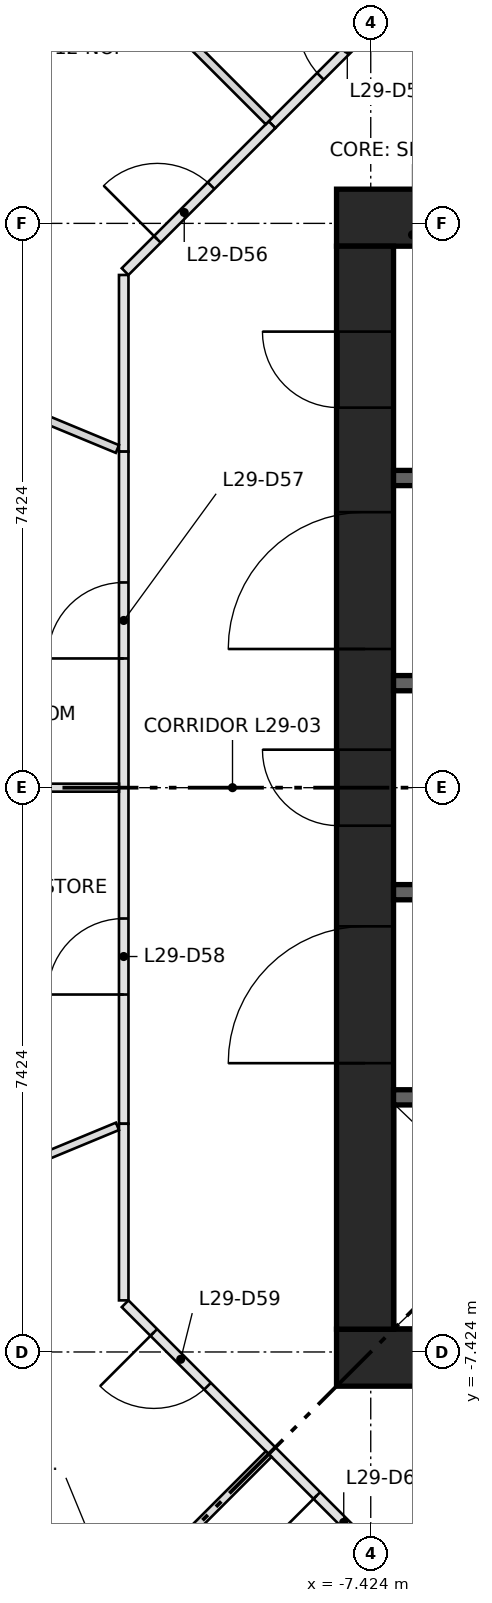
"""IFC4 building model, lengths in metres.
Left out: names, types, materials, properties, quantities, classifications, styles, units other than length and angle.
Written with IfcOpenShell. Run it as: python <this file> out.ifc"""

import sys

from ifc_helpers import new_model, si_unit, direction, frame, frame_2d, origin, place, context, subcontext, project, spatial, rectangle, extrude, element, fill, save


model = new_model("IFC4")
c1 = context("Model", 3, precision=1e-05, world=origin(), true_north=direction((0.0, 1.0)))
c2 = subcontext(c1, "Body", "Model", "MODEL_VIEW")
j1 = project(units=[si_unit("LENGTHUNIT", "METRE"), si_unit("PLANEANGLEUNIT", "RADIAN")], contexts=[c1])
p1 = place(None, origin())
s1 = spatial("IfcSite", under=j1, at=p1, CompositionType="ELEMENT")
p2 = place(p1, origin())
s2 = spatial("IfcBuilding", under=s1, at=p2, CompositionType="ELEMENT")
p3 = place(p2, frame((0.0, 0.0, 112.9)))
s3 = spatial("IfcBuildingStorey", under=s2, at=p3, CompositionType="ELEMENT", Elevation=112.9)
for number, where, z_axis, x_axis in (
    (1, (-7.874, -7.499, 0.0), (0.0, 0.0, 1.0), (1.0, 0.0, 0.0)),
    (2, (-7.874, 7.499, 0.0), (0.0, 0.0, 1.0), (1.0, 0.0, 0.0)),
):
    element("IfcWall", number, at=place(p3, frame(where, z_axis=z_axis, x_axis=x_axis)), inside=s3, PredefinedType="SHEAR", context=c2, shape_type="SweptSolid", body=[
        extrude(rectangle(XDim=15.748, YDim=0.75, at=frame_2d((7.874, 0.0))), origin(), (0.0, 0.0, 1.0), 3.65),
    ])
p4 = place(p3, frame((-7.499, -7.124, 0.0), z_axis=(0.0, 0.0, 1.0), x_axis=(0.0, 1.0, 0.0)))
e3 = element("IfcWall", 3, at=p4, inside=s3, PredefinedType="SHEAR", context=c2, shape_type="SweptSolid", body=[
    extrude(rectangle(XDim=14.248, YDim=0.75, at=frame_2d((7.124, 0.0))), origin(), (0.0, 0.0, 1.0), 3.65),
])
p5 = place(p4, frame((6.624, 0.0, 0.0)))
e4 = element("IfcOpeningElement", 4, at=p5, cuts=e3, PredefinedType="OPENING", context=c2, shape_type="SweptSolid", body=[
    extrude(rectangle(XDim=1.0, YDim=2.1, at=frame_2d((0.5, 1.05))), frame((0.0, 0.385, 0.0), z_axis=(0.0, -1.0, 0.0), x_axis=(1.0, 0.0, 0.0)), (0.0, 0.0, 1.0), 0.77),
])
p6 = place(p4, frame((3.5, 0.0, 0.0)))
e5 = element("IfcOpeningElement", 5, at=p6, cuts=e3, PredefinedType="OPENING", context=c2, shape_type="SweptSolid", body=[
    extrude(rectangle(XDim=1.8, YDim=2.1, at=frame_2d((0.9, 1.05))), frame((0.0, 0.385, 0.0), z_axis=(0.0, -1.0, 0.0), x_axis=(1.0, 0.0, 0.0)), (0.0, 0.0, 1.0), 0.77),
])
p7 = place(p4, frame((8.948, 0.0, 0.0)))
e6 = element("IfcOpeningElement", 6, at=p7, cuts=e3, PredefinedType="OPENING", context=c2, shape_type="SweptSolid", body=[
    extrude(rectangle(XDim=1.8, YDim=2.1, at=frame_2d((0.9, 1.05))), frame((0.0, 0.385, 0.0), z_axis=(0.0, -1.0, 0.0), x_axis=(1.0, 0.0, 0.0)), (0.0, 0.0, 1.0), 0.77),
])
p8 = place(p4, frame((12.124, 0.0, 0.0)))
e7 = element("IfcOpeningElement", 7, at=p8, cuts=e3, PredefinedType="OPENING", context=c2, shape_type="SweptSolid", body=[
    extrude(rectangle(XDim=1.0, YDim=2.1, at=frame_2d((0.5, 1.05))), frame((0.0, 0.385, 0.0), z_axis=(0.0, -1.0, 0.0), x_axis=(1.0, 0.0, 0.0)), (0.0, 0.0, 1.0), 0.77),
])
p9 = place(p3, frame((-7.124, -4.074, 0.0), z_axis=(0.0, 0.0, 1.0), x_axis=(1.0, 0.0, 0.0)))
e8 = element("IfcWall", 8, at=p9, inside=s3, PredefinedType="SHEAR", context=c2, shape_type="SweptSolid", body=[
    extrude(rectangle(XDim=14.248, YDim=0.2, at=frame_2d((7.124, 0.0))), origin(), (0.0, 0.0, 1.0), 3.3),
])
p10 = place(p9, frame((1.069, 0.0, 0.0)))
e9 = element("IfcOpeningElement", 9, at=p10, cuts=e8, PredefinedType="OPENING", context=c2, shape_type="SweptSolid", body=[
    extrude(rectangle(XDim=1.1, YDim=2.1, at=frame_2d((0.55, 1.05))), frame((0.0, 0.11, 0.0), z_axis=(0.0, -1.0, 0.0), x_axis=(1.0, 0.0, 0.0)), (0.0, 0.0, 1.0), 0.22),
])
p11 = place(p9, frame((4.206, 0.0, 0.0)))
e10 = element("IfcOpeningElement", 10, at=p11, cuts=e8, PredefinedType="OPENING", context=c2, shape_type="SweptSolid", body=[
    extrude(rectangle(XDim=1.1, YDim=2.1, at=frame_2d((0.55, 1.05))), frame((0.0, 0.11, 0.0), z_axis=(0.0, -1.0, 0.0), x_axis=(1.0, 0.0, 0.0)), (0.0, 0.0, 1.0), 0.22),
])
p12 = place(p9, frame((6.808, 0.0, 0.0)))
e11 = element("IfcOpeningElement", 11, at=p12, cuts=e8, PredefinedType="OPENING", context=c2, shape_type="SweptSolid", body=[
    extrude(rectangle(XDim=1.0, YDim=2.1, at=frame_2d((0.5, 1.05))), frame((0.0, 0.11, 0.0), z_axis=(0.0, -1.0, 0.0), x_axis=(1.0, 0.0, 0.0)), (0.0, 0.0, 1.0), 0.22),
])
p13 = place(p9, frame((8.777, 0.0, 0.0)))
e12 = element("IfcOpeningElement", 12, at=p13, cuts=e8, PredefinedType="OPENING", context=c2, shape_type="SweptSolid", body=[
    extrude(rectangle(XDim=1.0, YDim=2.1, at=frame_2d((0.5, 1.05))), frame((0.0, 0.11, 0.0), z_axis=(0.0, -1.0, 0.0), x_axis=(1.0, 0.0, 0.0)), (0.0, 0.0, 1.0), 0.22),
])
p14 = place(p9, frame((10.745, 0.0, 0.0)))
e13 = element("IfcOpeningElement", 13, at=p14, cuts=e8, PredefinedType="OPENING", context=c2, shape_type="SweptSolid", body=[
    extrude(rectangle(XDim=1.0, YDim=2.1, at=frame_2d((0.5, 1.05))), frame((0.0, 0.11, 0.0), z_axis=(0.0, -1.0, 0.0), x_axis=(1.0, 0.0, 0.0)), (0.0, 0.0, 1.0), 0.22),
])
p15 = place(p9, frame((12.714, 0.0, 0.0)))
e14 = element("IfcOpeningElement", 14, at=p15, cuts=e8, PredefinedType="OPENING", context=c2, shape_type="SweptSolid", body=[
    extrude(rectangle(XDim=1.0, YDim=2.1, at=frame_2d((0.5, 1.05))), frame((0.0, 0.11, 0.0), z_axis=(0.0, -1.0, 0.0), x_axis=(1.0, 0.0, 0.0)), (0.0, 0.0, 1.0), 0.22),
])
p16 = place(p3, frame((-7.124, 4.074, 0.0), z_axis=(0.0, 0.0, 1.0), x_axis=(1.0, 0.0, 0.0)))
e15 = element("IfcWall", 15, at=p16, inside=s3, PredefinedType="SHEAR", context=c2, shape_type="SweptSolid", body=[
    extrude(rectangle(XDim=7.124, YDim=0.2, at=frame_2d((3.562, 0.0))), origin(), (0.0, 0.0, 1.0), 3.3),
])
for number, where, z_axis, x_axis in (
    (16, (-7.124, -1.375, 0.0), (0.0, 0.0, 1.0), (1.0, 0.0, 0.0)),
    (17, (-7.124, 1.375, 0.0), (0.0, 0.0, 1.0), (1.0, 0.0, 0.0)),
):
    element("IfcWall", number, at=place(p3, frame(where, z_axis=z_axis, x_axis=x_axis)), inside=s3, PredefinedType="SHEAR", context=c2, shape_type="SweptSolid", body=[
        extrude(rectangle(XDim=2.75, YDim=0.2, at=frame_2d((1.375, 0.0))), origin(), (0.0, 0.0, 1.0), 3.3),
    ])
p17 = place(p3, frame((-8.722, 8.722, 0.0), z_axis=(0.0, 0.0, 1.0), x_axis=(0.707062130741, 0.707151428813, 0.0)))
e18 = element("IfcWall", 18, at=p17, inside=s3, PredefinedType="PARTITIONING", context=c2, shape_type="SweptSolid", body=[
    extrude(rectangle(XDim=2.734, YDim=0.125, at=frame_2d((1.367, 0.0))), origin(), (0.0, 0.0, 1.0), 3.3),
])
p18 = place(p17, frame((0.9, 0.0, 0.0)))
e19 = element("IfcOpeningElement", 19, at=p18, cuts=e18, PredefinedType="OPENING", context=c2, shape_type="SweptSolid", body=[
    extrude(rectangle(XDim=1.0, YDim=2.1, at=frame_2d((0.5, 1.05))), frame((0.0, 0.073, 0.0), z_axis=(0.0, -1.0, 0.0), x_axis=(1.0, 0.0, 0.0)), (0.0, 0.0, 1.0), 0.145),
])
p19 = place(p3, frame((-10.674, 4.421, 0.0), z_axis=(0.0, 0.0, 1.0), x_axis=(0.0, 1.0, 0.0)))
e20 = element("IfcWall", 20, at=p19, inside=s3, PredefinedType="PARTITIONING", context=c2, shape_type="SweptSolid", body=[
    extrude(rectangle(XDim=2.324, YDim=0.125, at=frame_2d((1.162, 0.0))), origin(), (0.0, 0.0, 1.0), 3.3),
])
p20 = place(p3, frame((-10.656, 6.789, 0.0), z_axis=(0.0, 0.0, 1.0), x_axis=(0.707151428813, 0.707062130741, 0.0)))
e21 = element("IfcWall", 21, at=p20, inside=s3, PredefinedType="PARTITIONING", context=c2, shape_type="SweptSolid", body=[
    extrude(rectangle(XDim=2.734, YDim=0.125, at=frame_2d((1.367, 0.0))), origin(), (0.0, 0.0, 1.0), 3.3),
])
p21 = place(p20, frame((0.6, 0.0, 0.0)))
e22 = element("IfcOpeningElement", 22, at=p21, cuts=e21, PredefinedType="OPENING", context=c2, shape_type="SweptSolid", body=[
    extrude(rectangle(XDim=1.0, YDim=2.1, at=frame_2d((0.5, 1.05))), frame((0.0, 0.073, 0.0), z_axis=(0.0, -1.0, 0.0), x_axis=(1.0, 0.0, 0.0)), (0.0, 0.0, 1.0), 0.145),
])
p22 = place(p3, frame((-10.674, 0.0, 0.0), z_axis=(0.0, 0.0, 1.0), x_axis=(0.0, 1.0, 0.0)))
e23 = element("IfcWall", 23, at=p22, inside=s3, PredefinedType="PARTITIONING", context=c2, shape_type="SweptSolid", body=[
    extrude(rectangle(XDim=4.421, YDim=0.125, at=frame_2d((2.211, 0.0))), origin(), (0.0, 0.0, 1.0), 3.3),
])
p23 = place(p22, frame((1.7, 0.0, 0.0)))
e24 = element("IfcOpeningElement", 24, at=p23, cuts=e23, PredefinedType="OPENING", context=c2, shape_type="SweptSolid", body=[
    extrude(rectangle(XDim=1.0, YDim=2.1, at=frame_2d((0.5, 1.05))), frame((0.0, 0.073, 0.0), z_axis=(0.0, -1.0, 0.0), x_axis=(1.0, 0.0, 0.0)), (0.0, 0.0, 1.0), 0.145),
])
p24 = place(p3, frame((-10.674, -4.421, 0.0), z_axis=(0.0, 0.0, 1.0), x_axis=(0.0, 1.0, 0.0)))
e25 = element("IfcWall", 25, at=p24, inside=s3, PredefinedType="PARTITIONING", context=c2, shape_type="SweptSolid", body=[
    extrude(rectangle(XDim=4.421, YDim=0.125, at=frame_2d((2.211, 0.0))), origin(), (0.0, 0.0, 1.0), 3.3),
])
p25 = place(p24, frame((1.7, 0.0, 0.0)))
e26 = element("IfcOpeningElement", 26, at=p25, cuts=e25, PredefinedType="OPENING", context=c2, shape_type="SweptSolid", body=[
    extrude(rectangle(XDim=1.0, YDim=2.1, at=frame_2d((0.5, 1.05))), frame((0.0, 0.073, 0.0), z_axis=(0.0, -1.0, 0.0), x_axis=(1.0, 0.0, 0.0)), (0.0, 0.0, 1.0), 0.145),
])
p26 = place(p3, frame((-10.674, -6.745, 0.0), z_axis=(0.0, 0.0, 1.0), x_axis=(0.0, 1.0, 0.0)))
e27 = element("IfcWall", 27, at=p26, inside=s3, PredefinedType="PARTITIONING", context=c2, shape_type="SweptSolid", body=[
    extrude(rectangle(XDim=2.324, YDim=0.125, at=frame_2d((1.162, 0.0))), origin(), (0.0, 0.0, 1.0), 3.3),
])
p27 = place(p3, frame((-8.722, -8.722, 0.0), z_axis=(0.0, 0.0, 1.0), x_axis=(-0.707151428813, 0.707062130741, 0.0)))
e28 = element("IfcWall", 28, at=p27, inside=s3, PredefinedType="PARTITIONING", context=c2, shape_type="SweptSolid", body=[
    extrude(rectangle(XDim=2.734, YDim=0.125, at=frame_2d((1.367, 0.0))), origin(), (0.0, 0.0, 1.0), 3.3),
])
p28 = place(p27, frame((1.2, 0.0, 0.0)))
e29 = element("IfcOpeningElement", 29, at=p28, cuts=e28, PredefinedType="OPENING", context=c2, shape_type="SweptSolid", body=[
    extrude(rectangle(XDim=1.0, YDim=2.1, at=frame_2d((0.5, 1.05))), frame((0.0, 0.073, 0.0), z_axis=(0.0, -1.0, 0.0), x_axis=(1.0, 0.0, 0.0)), (0.0, 0.0, 1.0), 0.145),
])
p29 = place(p3, frame((-6.789, -10.656, 0.0), z_axis=(0.0, 0.0, 1.0), x_axis=(-0.707062130741, 0.707151428813, 0.0)))
e30 = element("IfcWall", 30, at=p29, inside=s3, PredefinedType="PARTITIONING", context=c2, shape_type="SweptSolid", body=[
    extrude(rectangle(XDim=2.734, YDim=0.125, at=frame_2d((1.367, 0.0))), origin(), (0.0, 0.0, 1.0), 3.3),
])
p30 = place(p29, frame((0.9, 0.0, 0.0)))
e31 = element("IfcOpeningElement", 31, at=p30, cuts=e30, PredefinedType="OPENING", context=c2, shape_type="SweptSolid", body=[
    extrude(rectangle(XDim=1.0, YDim=2.1, at=frame_2d((0.5, 1.05))), frame((0.0, 0.073, 0.0), z_axis=(0.0, -1.0, 0.0), x_axis=(1.0, 0.0, 0.0)), (0.0, 0.0, 1.0), 0.145),
])
p31 = place(p3, frame((-8.767, 8.767, 0.0), z_axis=(0.0, 0.0, 1.0), x_axis=(-0.707106781187, 0.707106781187, 0.0)))
e32 = element("IfcWall", 32, at=p31, inside=s3, PredefinedType="PARTITIONING", context=c2, shape_type="SweptSolid", body=[
    extrude(rectangle(XDim=5.602, YDim=0.11, at=frame_2d((2.801, 0.0))), origin(), (0.0, 0.0, 1.0), 3.3),
])
p32 = place(p3, frame((-10.758, 4.456, 0.0), z_axis=(0.0, 0.0, 1.0), x_axis=(-0.923844847366, 0.382767158983, 0.0)))
e33 = element("IfcWall", 33, at=p32, inside=s3, PredefinedType="PARTITIONING", context=c2, shape_type="SweptSolid", body=[
    extrude(rectangle(XDim=1.886, YDim=0.11, at=frame_2d((0.943, 0.0))), origin(), (0.0, 0.0, 1.0), 3.3),
])
p33 = place(p3, frame((-10.737, 0.0, 0.0), z_axis=(0.0, 0.0, 1.0), x_axis=(-1.0, 0.0, 0.0)))
e34 = element("IfcWall", 34, at=p33, inside=s3, PredefinedType="PARTITIONING", context=c2, shape_type="SweptSolid", body=[
    extrude(rectangle(XDim=2.735, YDim=0.105, at=frame_2d((1.367, 0.0))), origin(), (0.0, 0.0, 1.0), 3.3),
])
p34 = place(p3, frame((-10.757, -4.456, 0.0), z_axis=(0.0, 0.0, 1.0), x_axis=(-0.923874914803, -0.382694580309, 0.0)))
e35 = element("IfcWall", 35, at=p34, inside=s3, PredefinedType="PARTITIONING", context=c2, shape_type="SweptSolid", body=[
    extrude(rectangle(XDim=1.887, YDim=0.105, at=frame_2d((0.943, 0.0))), origin(), (0.0, 0.0, 1.0), 3.3),
])
p35 = place(p3, frame((-12.728, -12.728, 0.0), z_axis=(0.0, 0.0, 1.0), x_axis=(0.707106781187, 0.707106781187, 0.0)))
e36 = element("IfcWall", 36, at=p35, inside=s3, PredefinedType="PARTITIONING", context=c2, shape_type="SweptSolid", body=[
    extrude(rectangle(XDim=5.602, YDim=0.105, at=frame_2d((2.801, 0.0))), origin(), (0.0, 0.0, 1.0), 3.3),
])
p36 = place(p5, origin())
e37 = element("IfcDoor", 37, at=p36, inside=s3, OperationType="SINGLE_SWING_RIGHT", PredefinedType="DOOR", context=c2, shape_type="SweptSolid", body=[
    extrude(rectangle(XDim=1.0, YDim=2.1, at=frame_2d((0.5, 1.05))), frame((0.0, 0.375, 0.0), z_axis=(0.0, -1.0, 0.0), x_axis=(1.0, 0.0, 0.0)), (0.0, 0.0, 1.0), 0.05),
])
fill(e4, e37)
p37 = place(p6, origin())
e38 = element("IfcDoor", 38, at=p37, inside=s3, OperationType="DOUBLE_DOOR_SINGLE_SWING", PredefinedType="DOOR", context=c2, shape_type="SweptSolid", body=[
    extrude(rectangle(XDim=1.8, YDim=2.1, at=frame_2d((0.9, 1.05))), frame((0.0, 0.025, 0.0), z_axis=(0.0, -1.0, 0.0), x_axis=(1.0, 0.0, 0.0)), (0.0, 0.0, 1.0), 0.05),
])
fill(e5, e38)
p38 = place(p7, origin())
e39 = element("IfcDoor", 39, at=p38, inside=s3, OperationType="DOUBLE_DOOR_SINGLE_SWING", PredefinedType="DOOR", context=c2, shape_type="SweptSolid", body=[
    extrude(rectangle(XDim=1.8, YDim=2.1, at=frame_2d((0.9, 1.05))), frame((0.0, 0.025, 0.0), z_axis=(0.0, -1.0, 0.0), x_axis=(1.0, 0.0, 0.0)), (0.0, 0.0, 1.0), 0.05),
])
fill(e6, e39)
p39 = place(p8, origin())
e40 = element("IfcDoor", 40, at=p39, inside=s3, OperationType="SINGLE_SWING_RIGHT", PredefinedType="DOOR", context=c2, shape_type="SweptSolid", body=[
    extrude(rectangle(XDim=1.0, YDim=2.1, at=frame_2d((0.5, 1.05))), frame((0.0, 0.375, 0.0), z_axis=(0.0, -1.0, 0.0), x_axis=(1.0, 0.0, 0.0)), (0.0, 0.0, 1.0), 0.05),
])
fill(e7, e40)
p40 = place(p18, origin())
e41 = element("IfcDoor", 41, at=p40, inside=s3, OperationType="SINGLE_SWING_RIGHT", PredefinedType="DOOR", context=c2, shape_type="SweptSolid", body=[
    extrude(rectangle(XDim=1.0, YDim=2.1, at=frame_2d((0.5, 1.05))), frame((0.0, 0.025, 0.0), z_axis=(0.0, -1.0, 0.0), x_axis=(1.0, 0.0, 0.0)), (0.0, 0.0, 1.0), 0.05),
])
fill(e19, e41)
p41 = place(p21, origin())
e42 = element("IfcDoor", 42, at=p41, inside=s3, OperationType="SINGLE_SWING_LEFT", PredefinedType="DOOR", context=c2, shape_type="SweptSolid", body=[
    extrude(rectangle(XDim=1.0, YDim=2.1, at=frame_2d((0.5, 1.05))), frame((0.0, 0.025, 0.0), z_axis=(0.0, -1.0, 0.0), x_axis=(1.0, 0.0, 0.0)), (0.0, 0.0, 1.0), 0.05),
])
fill(e22, e42)
p42 = place(p23, origin())
e43 = element("IfcDoor", 43, at=p42, inside=s3, OperationType="SINGLE_SWING_LEFT", PredefinedType="DOOR", context=c2, shape_type="SweptSolid", body=[
    extrude(rectangle(XDim=1.0, YDim=2.1, at=frame_2d((0.5, 1.05))), frame((0.0, 0.025, 0.0), z_axis=(0.0, -1.0, 0.0), x_axis=(1.0, 0.0, 0.0)), (0.0, 0.0, 1.0), 0.05),
])
fill(e24, e43)
p43 = place(p25, origin())
e44 = element("IfcDoor", 44, at=p43, inside=s3, OperationType="SINGLE_SWING_LEFT", PredefinedType="DOOR", context=c2, shape_type="SweptSolid", body=[
    extrude(rectangle(XDim=1.0, YDim=2.1, at=frame_2d((0.5, 1.05))), frame((0.0, 0.025, 0.0), z_axis=(0.0, -1.0, 0.0), x_axis=(1.0, 0.0, 0.0)), (0.0, 0.0, 1.0), 0.05),
])
fill(e26, e44)
p44 = place(p28, origin())
e45 = element("IfcDoor", 45, at=p44, inside=s3, OperationType="SINGLE_SWING_RIGHT", PredefinedType="DOOR", context=c2, shape_type="SweptSolid", body=[
    extrude(rectangle(XDim=1.0, YDim=2.1, at=frame_2d((0.5, 1.05))), frame((0.0, 0.025, 0.0), z_axis=(0.0, -1.0, 0.0), x_axis=(1.0, 0.0, 0.0)), (0.0, 0.0, 1.0), 0.05),
])
fill(e29, e45)
p45 = place(p30, origin())
e46 = element("IfcDoor", 46, at=p45, inside=s3, OperationType="SINGLE_SWING_RIGHT", PredefinedType="DOOR", context=c2, shape_type="SweptSolid", body=[
    extrude(rectangle(XDim=1.0, YDim=2.1, at=frame_2d((0.5, 1.05))), frame((0.0, 0.025, 0.0), z_axis=(0.0, -1.0, 0.0), x_axis=(1.0, 0.0, 0.0)), (0.0, 0.0, 1.0), 0.05),
])
fill(e31, e46)
save(model, sys.argv[1])
